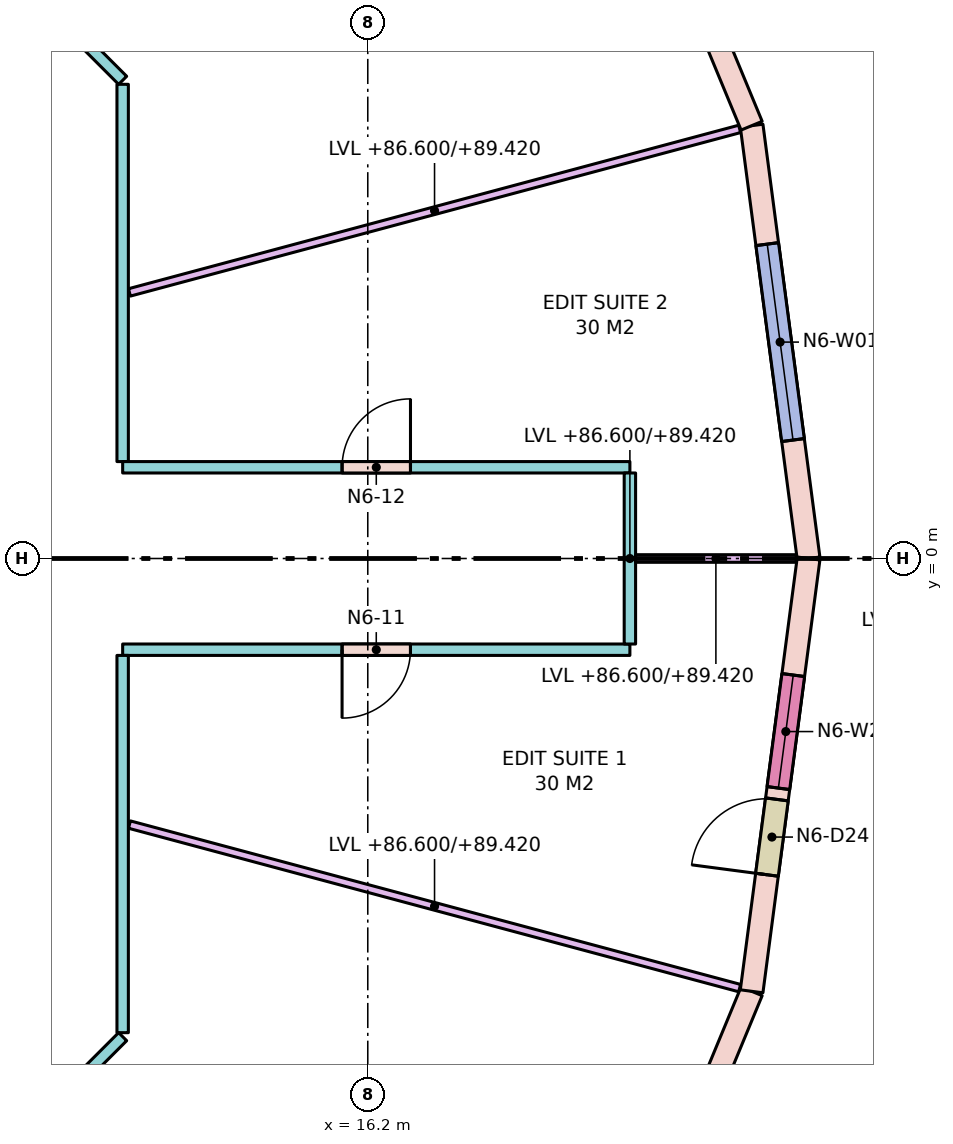
"""IFC4 building model, lengths in metres.
Left out: names, types, materials, properties, quantities, classifications, styles, units other than length and angle.
Written with IfcOpenShell. Run it as: python <this file> out.ifc"""

import sys

from ifc_helpers import new_model, si_unit, direction, frame, frame_2d, origin, place, context, subcontext, project, spatial, rectangle, extrude, element, fill, save


model = new_model("IFC4")
c1 = context("Model", 3, precision=1e-05, world=origin(), true_north=direction((0.0, 1.0)))
c2 = subcontext(c1, "Body", "Model", "MODEL_VIEW")
j1 = project(units=[si_unit("LENGTHUNIT", "METRE"), si_unit("PLANEANGLEUNIT", "RADIAN")], contexts=[c1])
p1 = place(None, origin())
s1 = spatial("IfcSite", under=j1, at=p1, CompositionType="ELEMENT")
p2 = place(p1, origin())
s2 = spatial("IfcBuilding", under=s1, at=p2, CompositionType="ELEMENT")
p3 = place(p2, frame((0.0, 0.0, 86.6)))
s3 = spatial("IfcBuildingStorey", under=s2, at=p3, CompositionType="ELEMENT", Elevation=86.6)
p4 = place(p3, frame((22.0, 0.0, 0.0), z_axis=(0.0, 0.0, 1.0), x_axis=(-0.130503995834, 0.991447783331, 0.0)))
e1 = element("IfcWall", 1, at=p4, inside=s3, PredefinedType="STANDARD", context=c2, shape_type="SweptSolid", body=[
    extrude(rectangle(XDim=5.743, YDim=0.3, at=frame_2d((2.872, 0.0))), origin(), (0.0, 0.0, 1.0), 3.72),
])
p5 = place(p4, frame((1.572, 0.0, 0.8)))
e2 = element("IfcOpeningElement", 2, at=p5, cuts=e1, PredefinedType="OPENING", context=c2, shape_type="SweptSolid", body=[
    extrude(rectangle(XDim=2.6, YDim=2.7, at=frame_2d((1.3, 1.35))), frame((0.0, 0.16, 0.0), z_axis=(0.0, -1.0, 0.0), x_axis=(1.0, 0.0, 0.0)), (0.0, 0.0, 1.0), 0.32),
])
p6 = place(p3, frame((21.25, 5.694, 0.0), z_axis=(0.0, 0.0, 1.0), x_axis=(-0.382715966503, 0.923866055759, 0.0)))
e3 = element("IfcWall", 3, at=p6, inside=s3, PredefinedType="STANDARD", context=c2, shape_type="SweptSolid", body=[
    extrude(rectangle(XDim=5.743, YDim=0.3, at=frame_2d((2.872, 0.0))), origin(), (0.0, 0.0, 1.0), 3.72),
])
p7 = place(p6, frame((1.547, 0.0, 0.0)))
e4 = element("IfcOpeningElement", 4, at=p7, cuts=e3, PredefinedType="OPENING", context=c2, shape_type="SweptSolid", body=[
    extrude(rectangle(XDim=1.0, YDim=2.4, at=frame_2d((0.5, 1.2))), frame((0.0, 0.16, 0.0), z_axis=(0.0, -1.0, 0.0), x_axis=(1.0, 0.0, 0.0)), (0.0, 0.0, 1.0), 0.32),
])
p8 = place(p6, frame((2.697, 0.0, 0.8)))
e5 = element("IfcOpeningElement", 5, at=p8, cuts=e3, PredefinedType="OPENING", context=c2, shape_type="SweptSolid", body=[
    extrude(rectangle(XDim=1.5, YDim=2.7, at=frame_2d((0.75, 1.35))), frame((0.0, 0.16, 0.0), z_axis=(0.0, -1.0, 0.0), x_axis=(1.0, 0.0, 0.0)), (0.0, 0.0, 1.0), 0.32),
])
p9 = place(p3, frame((19.052, -11.0, 0.0), z_axis=(0.0, 0.0, 1.0), x_axis=(0.382715966503, 0.923866055759, 0.0)))
e6 = element("IfcWall", 6, at=p9, inside=s3, PredefinedType="STANDARD", context=c2, shape_type="SweptSolid", body=[
    extrude(rectangle(XDim=5.743, YDim=0.3, at=frame_2d((2.872, 0.0))), origin(), (0.0, 0.0, 1.0), 3.72),
])
p10 = place(p9, frame((1.572, 0.0, 0.8)))
e7 = element("IfcOpeningElement", 7, at=p10, cuts=e6, PredefinedType="OPENING", context=c2, shape_type="SweptSolid", body=[
    extrude(rectangle(XDim=2.6, YDim=2.7, at=frame_2d((1.3, 1.35))), frame((0.0, 0.16, 0.0), z_axis=(0.0, -1.0, 0.0), x_axis=(1.0, 0.0, 0.0)), (0.0, 0.0, 1.0), 0.32),
])
p11 = place(p3, frame((21.25, -5.694, 0.0), z_axis=(0.0, 0.0, 1.0), x_axis=(0.130503995834, 0.991447783331, 0.0)))
e8 = element("IfcWall", 8, at=p11, inside=s3, PredefinedType="STANDARD", context=c2, shape_type="SweptSolid", body=[
    extrude(rectangle(XDim=5.743, YDim=0.3, at=frame_2d((2.872, 0.0))), origin(), (0.0, 0.0, 1.0), 3.72),
])
p12 = place(p11, frame((1.547, 0.0, 0.0)))
e9 = element("IfcOpeningElement", 9, at=p12, cuts=e8, PredefinedType="OPENING", context=c2, shape_type="SweptSolid", body=[
    extrude(rectangle(XDim=1.0, YDim=2.4, at=frame_2d((0.5, 1.2))), frame((0.0, 0.16, 0.0), z_axis=(0.0, -1.0, 0.0), x_axis=(1.0, 0.0, 0.0)), (0.0, 0.0, 1.0), 0.32),
])
p13 = place(p11, frame((2.697, 0.0, 0.8)))
e10 = element("IfcOpeningElement", 10, at=p13, cuts=e8, PredefinedType="OPENING", context=c2, shape_type="SweptSolid", body=[
    extrude(rectangle(XDim=1.5, YDim=2.7, at=frame_2d((0.75, 1.35))), frame((0.0, 0.16, 0.0), z_axis=(0.0, -1.0, 0.0), x_axis=(1.0, 0.0, 0.0)), (0.0, 0.0, 1.0), 0.32),
])
p14 = place(p3, frame((19.649, -1.2, 0.0), z_axis=(0.0, 0.0, 1.0), x_axis=(-1.0, 0.0, 0.0)))
e11 = element("IfcWall", 11, at=p14, inside=s3, PredefinedType="PARTITIONING", context=c2, shape_type="SweptSolid", body=[
    extrude(rectangle(XDim=6.674, YDim=0.15, at=frame_2d((3.337, 0.0))), origin(), (0.0, 0.0, 1.0), 3.72),
])
p15 = place(p14, frame((2.887, 0.0, 0.0)))
e12 = element("IfcOpeningElement", 12, at=p15, cuts=e11, PredefinedType="OPENING", context=c2, shape_type="SweptSolid", body=[
    extrude(rectangle(XDim=0.9, YDim=2.1, at=frame_2d((0.45, 1.05))), frame((0.0, 0.085, 0.0), z_axis=(0.0, -1.0, 0.0), x_axis=(1.0, 0.0, 0.0)), (0.0, 0.0, 1.0), 0.17),
])
p16 = place(p3, frame((12.975, -1.275, 0.0), z_axis=(0.0, 0.0, 1.0), x_axis=(0.0, -1.0, 0.0)))
e13 = element("IfcWall", 13, at=p16, inside=s3, PredefinedType="PARTITIONING", context=c2, shape_type="SweptSolid", body=[
    extrude(rectangle(XDim=4.963, YDim=0.15, at=frame_2d((2.482, 0.0))), origin(), (0.0, 0.0, 1.0), 2.82),
])
p17 = place(p3, frame((12.975, -6.291, 0.0), z_axis=(0.0, 0.0, 1.0), x_axis=(-0.707106781187, -0.707106781187, 0.0)))
e14 = element("IfcWall", 14, at=p17, inside=s3, PredefinedType="PARTITIONING", context=c2, shape_type="SweptSolid", body=[
    extrude(rectangle(XDim=6.624, YDim=0.15, at=frame_2d((3.312, 0.0))), origin(), (0.0, 0.0, 1.0), 2.82),
])
p18 = place(p17, frame((1.938, 0.0, 0.0)))
e15 = element("IfcOpeningElement", 15, at=p18, cuts=e14, PredefinedType="OPENING", context=c2, shape_type="SweptSolid", body=[
    extrude(rectangle(XDim=0.9, YDim=2.1, at=frame_2d((0.45, 1.05))), frame((0.0, 0.085, 0.0), z_axis=(0.0, -1.0, 0.0), x_axis=(1.0, 0.0, 0.0)), (0.0, 0.0, 1.0), 0.17),
])
p19 = place(p3, frame((8.328, 10.938, 0.0), z_axis=(0.0, 0.0, 1.0), x_axis=(0.707125355289, -0.707088206597, 0.0)))
e16 = element("IfcWall", 16, at=p19, inside=s3, PredefinedType="PARTITIONING", context=c2, shape_type="SweptSolid", body=[
    extrude(rectangle(XDim=6.572, YDim=0.15, at=frame_2d((3.286, 0.0))), origin(), (0.0, 0.0, 1.0), 2.82),
])
p20 = place(p19, frame((2.386, 0.0, 0.0)))
e17 = element("IfcOpeningElement", 17, at=p20, cuts=e16, PredefinedType="OPENING", context=c2, shape_type="SweptSolid", body=[
    extrude(rectangle(XDim=1.8, YDim=2.1, at=frame_2d((0.9, 1.05))), frame((0.0, 0.085, 0.0), z_axis=(0.0, -1.0, 0.0), x_axis=(1.0, 0.0, 0.0)), (0.0, 0.0, 1.0), 0.17),
])
p21 = place(p3, frame((12.975, 6.238, 0.0), z_axis=(0.0, 0.0, 1.0), x_axis=(0.0, -1.0, 0.0)))
e18 = element("IfcWall", 18, at=p21, inside=s3, PredefinedType="PARTITIONING", context=c2, shape_type="SweptSolid", body=[
    extrude(rectangle(XDim=4.963, YDim=0.15, at=frame_2d((2.482, 0.0))), origin(), (0.0, 0.0, 1.0), 2.82),
])
p22 = place(p3, frame((12.975, 1.2, 0.0), z_axis=(0.0, 0.0, 1.0), x_axis=(1.0, 0.0, 0.0)))
e19 = element("IfcWall", 19, at=p22, inside=s3, PredefinedType="PARTITIONING", context=c2, shape_type="SweptSolid", body=[
    extrude(rectangle(XDim=6.674, YDim=0.15, at=frame_2d((3.337, 0.0))), origin(), (0.0, 0.0, 1.0), 3.72),
])
p23 = place(p22, frame((2.887, 0.0, 0.0)))
e20 = element("IfcOpeningElement", 20, at=p23, cuts=e19, PredefinedType="OPENING", context=c2, shape_type="SweptSolid", body=[
    extrude(rectangle(XDim=0.9, YDim=2.1, at=frame_2d((0.45, 1.05))), frame((0.0, 0.085, 0.0), z_axis=(0.0, -1.0, 0.0), x_axis=(1.0, 0.0, 0.0)), (0.0, 0.0, 1.0), 0.17),
])
p24 = place(p3, frame((19.649, 1.125, 0.0), z_axis=(0.0, 0.0, 1.0), x_axis=(0.0, -1.0, 0.0)))
e21 = element("IfcWall", 21, at=p24, inside=s3, PredefinedType="PARTITIONING", context=c2, shape_type="SweptSolid", body=[
    extrude(rectangle(XDim=2.25, YDim=0.15, at=frame_2d((1.125, 0.0))), origin(), (0.0, 0.0, 1.0), 2.82),
])
p25 = place(p3, frame((19.724, 0.0, 0.0), z_axis=(0.0, 0.0, 1.0), x_axis=(1.0, 0.0, 0.0)))
e22 = element("IfcWall", 22, at=p25, inside=s3, PredefinedType="PARTITIONING", context=c2, shape_type="SweptSolid", body=[
    extrude(rectangle(XDim=2.113, YDim=0.1, at=frame_2d((1.057, 0.0))), origin(), (0.0, 0.0, 1.0), 2.82),
])
for number, where, z_axis, x_axis in (
    (23, (13.064, 3.5, 0.0), (0.0, 0.0, 1.0), (0.966, 0.259, 0.0)),
    (24, (13.064, -3.5, 0.0), (0.0, 0.0, 1.0), (0.966, -0.259, 0.0)),
):
    element("IfcWall", number, at=place(p3, frame(where, z_axis=z_axis, x_axis=x_axis)), inside=s3, PredefinedType="PARTITIONING", context=c2, shape_type="SweptSolid", body=[
        extrude(rectangle(XDim=8.312, YDim=0.1, at=frame_2d((4.156, 0.0))), origin(), (0.0, 0.0, 1.0), 2.82),
    ])
p26 = place(p5, origin())
e25 = element("IfcWindow", 25, at=p26, inside=s3, PartitioningType="SINGLE_PANEL", PredefinedType="WINDOW", context=c2, shape_type="SweptSolid", body=[
    extrude(rectangle(XDim=2.6, YDim=2.7, at=frame_2d((1.3, 1.35))), frame((0.0, 0.03, 0.0), z_axis=(0.0, -1.0, 0.0), x_axis=(1.0, 0.0, 0.0)), (0.0, 0.0, 1.0), 0.06),
])
fill(e2, e25)
p27 = place(p12, origin())
e26 = element("IfcDoor", 26, at=p27, inside=s3, OperationType="SINGLE_SWING_LEFT", PredefinedType="DOOR", context=c2, shape_type="SweptSolid", body=[
    extrude(rectangle(XDim=1.0, YDim=2.4, at=frame_2d((0.5, 1.2))), frame((0.0, 0.025, 0.0), z_axis=(0.0, -1.0, 0.0), x_axis=(1.0, 0.0, 0.0)), (0.0, 0.0, 1.0), 0.05),
])
fill(e9, e26)
p28 = place(p13, origin())
e27 = element("IfcWindow", 27, at=p28, inside=s3, PartitioningType="SINGLE_PANEL", PredefinedType="WINDOW", context=c2, shape_type="SweptSolid", body=[
    extrude(rectangle(XDim=1.5, YDim=2.7, at=frame_2d((0.75, 1.35))), frame((0.0, 0.03, 0.0), z_axis=(0.0, -1.0, 0.0), x_axis=(1.0, 0.0, 0.0)), (0.0, 0.0, 1.0), 0.06),
])
fill(e10, e27)
p29 = place(p15, origin())
e28 = element("IfcDoor", 28, at=p29, inside=s3, OperationType="SINGLE_SWING_RIGHT", PredefinedType="DOOR", context=c2, shape_type="SweptSolid", body=[
    extrude(rectangle(XDim=0.9, YDim=2.1, at=frame_2d((0.45, 1.05))), frame((0.0, 0.025, 0.0), z_axis=(0.0, -1.0, 0.0), x_axis=(1.0, 0.0, 0.0)), (0.0, 0.0, 1.0), 0.05),
])
fill(e12, e28)
p30 = place(p23, origin())
e29 = element("IfcDoor", 29, at=p30, inside=s3, OperationType="SINGLE_SWING_RIGHT", PredefinedType="DOOR", context=c2, shape_type="SweptSolid", body=[
    extrude(rectangle(XDim=0.9, YDim=2.1, at=frame_2d((0.45, 1.05))), frame((0.0, 0.025, 0.0), z_axis=(0.0, -1.0, 0.0), x_axis=(1.0, 0.0, 0.0)), (0.0, 0.0, 1.0), 0.05),
])
fill(e20, e29)
save(model, sys.argv[1])
